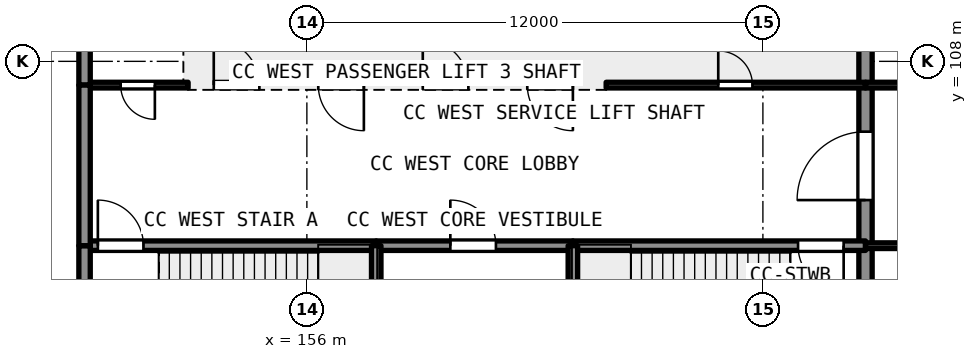
"""IFC4 building model, lengths in metres.
Left out: names, types, materials, properties, quantities, classifications, styles, units other than length and angle.
Written with IfcOpenShell. Run it as: python <this file> out.ifc"""

import sys

from ifc_helpers import new_model, si_unit, direction, frame, frame_2d, origin, place, context, subcontext, project, spatial, rectangle, extrude, element, fill, save


model = new_model("IFC4")
c1 = context("Model", 3, precision=1e-05, world=origin(), true_north=direction((0.0, 1.0)))
c2 = subcontext(c1, "Body", "Model", "MODEL_VIEW")
j1 = project(units=[si_unit("LENGTHUNIT", "METRE"), si_unit("PLANEANGLEUNIT", "RADIAN")], contexts=[c1])
p1 = place(None, origin())
s1 = spatial("IfcSite", under=j1, at=p1, CompositionType="ELEMENT")
p2 = place(p1, origin())
s2 = spatial("IfcBuilding", under=s1, at=p2, CompositionType="ELEMENT")
p3 = place(p2, frame((0.0, 0.0, 20.4)))
s3 = spatial("IfcBuildingStorey", under=s2, at=p3, CompositionType="ELEMENT", Elevation=20.4)
p4 = place(p3, frame((170.7, 100.0, 0.0), z_axis=(0.0, 0.0, 1.0), x_axis=(0.0, 1.0, 0.0)))
e1 = element("IfcWall", 1, at=p4, inside=s3, PredefinedType="SHEAR", context=c2, shape_type="SweptSolid", body=[
    extrude(rectangle(XDim=3.15, YDim=0.35, at=frame_2d((1.575, 0.0))), origin(), (0.0, 0.0, 1.0), 4.59),
])
p5 = place(p3, frame((170.7, 103.15, 0.0), z_axis=(0.0, 0.0, 1.0), x_axis=(0.0, 1.0, 0.0)))
e2 = element("IfcWall", 2, at=p5, inside=s3, PredefinedType="SHEAR", context=c2, shape_type="SweptSolid", body=[
    extrude(rectangle(XDim=7.25, YDim=0.35, at=frame_2d((3.625, 0.0))), origin(), (0.0, 0.0, 1.0), 4.59),
])
p6 = place(p5, frame((1.2, 0.0, 0.0)))
e3 = element("IfcOpeningElement", 3, at=p6, cuts=e2, PredefinedType="OPENING", context=c2, shape_type="SweptSolid", body=[
    extrude(rectangle(XDim=1.8, YDim=2.1, at=frame_2d((0.9, 1.05))), frame((0.0, 0.186, 0.0), z_axis=(0.0, -1.0, 0.0), x_axis=(1.0, 0.0, 0.0)), (0.0, 0.0, 1.0), 0.371),
])
p7 = place(p3, frame((150.3, 103.15, 0.0), z_axis=(0.0, 0.0, 1.0), x_axis=(1.0, 0.0, 0.0)))
e4 = element("IfcWall", 4, at=p7, inside=s3, PredefinedType="SHEAR", context=c2, shape_type="SweptSolid", body=[
    extrude(rectangle(XDim=7.525, YDim=0.25, at=frame_2d((3.762, 0.0))), origin(), (0.0, 0.0, 1.0), 4.59),
])
p8 = place(p7, frame((0.2, 0.0, 0.0)))
e5 = element("IfcOpeningElement", 5, at=p8, cuts=e4, PredefinedType="OPENING", context=c2, shape_type="SweptSolid", body=[
    extrude(rectangle(XDim=1.2, YDim=2.1, at=frame_2d((0.6, 1.05))), frame((0.0, 0.135, 0.0), z_axis=(0.0, -1.0, 0.0), x_axis=(1.0, 0.0, 0.0)), (0.0, 0.0, 1.0), 0.271),
])
p9 = place(p3, frame((157.825, 103.15, 0.0), z_axis=(0.0, 0.0, 1.0), x_axis=(1.0, 0.0, 0.0)))
e6 = element("IfcWall", 6, at=p9, inside=s3, PredefinedType="SHEAR", context=c2, shape_type="SweptSolid", body=[
    extrude(rectangle(XDim=5.175, YDim=0.25, at=frame_2d((2.587, 0.0))), origin(), (0.0, 0.0, 1.0), 4.59),
])
p10 = place(p9, frame((1.95, 0.0, 0.0)))
e7 = element("IfcOpeningElement", 7, at=p10, cuts=e6, PredefinedType="OPENING", context=c2, shape_type="SweptSolid", body=[
    extrude(rectangle(XDim=1.2, YDim=2.1, at=frame_2d((0.6, 1.05))), frame((0.0, 0.135, 0.0), z_axis=(0.0, -1.0, 0.0), x_axis=(1.0, 0.0, 0.0)), (0.0, 0.0, 1.0), 0.271),
])
p11 = place(p3, frame((163.0, 103.15, 0.0), z_axis=(0.0, 0.0, 1.0), x_axis=(1.0, 0.0, 0.0)))
e8 = element("IfcWall", 8, at=p11, inside=s3, PredefinedType="SHEAR", context=c2, shape_type="SweptSolid", body=[
    extrude(rectangle(XDim=7.7, YDim=0.25, at=frame_2d((3.85, 0.0))), origin(), (0.0, 0.0, 1.0), 4.59),
])
p12 = place(p11, frame((5.925, 0.0, 0.0)))
e9 = element("IfcOpeningElement", 9, at=p12, cuts=e8, PredefinedType="OPENING", context=c2, shape_type="SweptSolid", body=[
    extrude(rectangle(XDim=1.2, YDim=2.1, at=frame_2d((0.6, 1.05))), frame((0.0, 0.135, 0.0), z_axis=(0.0, -1.0, 0.0), x_axis=(1.0, 0.0, 0.0)), (0.0, 0.0, 1.0), 0.271),
])
for number, where, z_axis, x_axis in (
    (10, (157.825, 100.0, 0.0), (0.0, 0.0, 1.0), (0.0, 1.0, 0.0)),
    (11, (163.0, 100.0, 0.0), (0.0, 0.0, 1.0), (0.0, 1.0, 0.0)),
):
    element("IfcWall", number, at=place(p3, frame(where, z_axis=z_axis, x_axis=x_axis)), inside=s3, PredefinedType="SHEAR", context=c2, shape_type="SweptSolid", body=[
        extrude(rectangle(XDim=3.15, YDim=0.25, at=frame_2d((1.575, 0.0))), origin(), (0.0, 0.0, 1.0), 4.59),
    ])
p13 = place(p2, origin())
s4 = spatial("IfcBuildingStorey", under=s2, at=p13, CompositionType="ELEMENT", Elevation=0.0)
for number, where, z_axis, x_axis in (
    (12, (152.875, 107.375, -1.2), (0.0, 0.0, 1.0), (0.0, 1.0, 0.0)),
    (13, (155.625, 107.375, -1.2), (0.0, 0.0, 1.0), (0.0, 1.0, 0.0)),
    (14, (158.375, 107.375, -1.2), (0.0, 0.0, 1.0), (0.0, 1.0, 0.0)),
    (15, (161.125, 107.375, -1.2), (0.0, 0.0, 1.0), (0.0, 1.0, 0.0)),
    (16, (163.875, 107.375, -1.2), (0.0, 0.0, 1.0), (0.0, 1.0, 0.0)),
):
    element("IfcWall", number, at=place(p13, frame(where, z_axis=z_axis, x_axis=x_axis)), inside=s4, PredefinedType="SHEAR", context=c2, shape_type="SweptSolid", body=[
        extrude(rectangle(XDim=3.025, YDim=0.25, at=frame_2d((1.512, 0.0))), origin(), (0.0, 0.0, 1.0), 30.79),
    ])
p14 = place(p13, frame((163.875, 107.375, -1.2), z_axis=(0.0, 0.0, 1.0), x_axis=(-1.0, 0.0, 0.0)))
e17 = element("IfcWall", 17, at=p14, inside=s4, PredefinedType="SHEAR", context=c2, shape_type="SweptSolid", body=[
    extrude(rectangle(XDim=11.0, YDim=0.25, at=frame_2d((5.5, 0.0))), origin(), (0.0, 0.0, 1.0), 30.79),
])
p15 = place(p14, frame((9.125, 0.0, 1.2)))
e18 = element("IfcOpeningElement", 18, at=p15, cuts=e17, PredefinedType="OPENING", context=c2, shape_type="SweptSolid", body=[
    extrude(rectangle(XDim=1.2, YDim=2.1, at=frame_2d((0.6, 1.05))), frame((0.0, 0.135, 0.0), z_axis=(0.0, -1.0, 0.0), x_axis=(1.0, 0.0, 0.0)), (0.0, 0.0, 1.0), 0.271),
])
p16 = place(p14, frame((6.375, 0.0, 1.2)))
e19 = element("IfcOpeningElement", 19, at=p16, cuts=e17, PredefinedType="OPENING", context=c2, shape_type="SweptSolid", body=[
    extrude(rectangle(XDim=1.2, YDim=2.1, at=frame_2d((0.6, 1.05))), frame((0.0, 0.135, 0.0), z_axis=(0.0, -1.0, 0.0), x_axis=(1.0, 0.0, 0.0)), (0.0, 0.0, 1.0), 0.271),
])
p17 = place(p14, frame((3.625, 0.0, 1.2)))
e20 = element("IfcOpeningElement", 20, at=p17, cuts=e17, PredefinedType="OPENING", context=c2, shape_type="SweptSolid", body=[
    extrude(rectangle(XDim=1.2, YDim=2.1, at=frame_2d((0.6, 1.05))), frame((0.0, 0.135, 0.0), z_axis=(0.0, -1.0, 0.0), x_axis=(1.0, 0.0, 0.0)), (0.0, 0.0, 1.0), 0.271),
])
p18 = place(p14, frame((0.875, 0.0, 1.2)))
e21 = element("IfcOpeningElement", 21, at=p18, cuts=e17, PredefinedType="OPENING", context=c2, shape_type="SweptSolid", body=[
    extrude(rectangle(XDim=1.2, YDim=2.1, at=frame_2d((0.6, 1.05))), frame((0.0, 0.135, 0.0), z_axis=(0.0, -1.0, 0.0), x_axis=(1.0, 0.0, 0.0)), (0.0, 0.0, 1.0), 0.271),
])
p19 = place(p14, frame((9.125, 0.0, 10.2)))
e22 = element("IfcOpeningElement", 22, at=p19, cuts=e17, PredefinedType="OPENING", context=c2, shape_type="SweptSolid", body=[
    extrude(rectangle(XDim=1.2, YDim=2.1, at=frame_2d((0.6, 1.05))), frame((0.0, 0.135, 0.0), z_axis=(0.0, -1.0, 0.0), x_axis=(1.0, 0.0, 0.0)), (0.0, 0.0, 1.0), 0.271),
])
p20 = place(p14, frame((6.375, 0.0, 10.2)))
e23 = element("IfcOpeningElement", 23, at=p20, cuts=e17, PredefinedType="OPENING", context=c2, shape_type="SweptSolid", body=[
    extrude(rectangle(XDim=1.2, YDim=2.1, at=frame_2d((0.6, 1.05))), frame((0.0, 0.135, 0.0), z_axis=(0.0, -1.0, 0.0), x_axis=(1.0, 0.0, 0.0)), (0.0, 0.0, 1.0), 0.271),
])
p21 = place(p14, frame((3.625, 0.0, 10.2)))
e24 = element("IfcOpeningElement", 24, at=p21, cuts=e17, PredefinedType="OPENING", context=c2, shape_type="SweptSolid", body=[
    extrude(rectangle(XDim=1.2, YDim=2.1, at=frame_2d((0.6, 1.05))), frame((0.0, 0.135, 0.0), z_axis=(0.0, -1.0, 0.0), x_axis=(1.0, 0.0, 0.0)), (0.0, 0.0, 1.0), 0.271),
])
p22 = place(p14, frame((0.875, 0.0, 10.2)))
e25 = element("IfcOpeningElement", 25, at=p22, cuts=e17, PredefinedType="OPENING", context=c2, shape_type="SweptSolid", body=[
    extrude(rectangle(XDim=1.2, YDim=2.1, at=frame_2d((0.6, 1.05))), frame((0.0, 0.135, 0.0), z_axis=(0.0, -1.0, 0.0), x_axis=(1.0, 0.0, 0.0)), (0.0, 0.0, 1.0), 0.271),
])
p23 = place(p14, frame((9.125, 0.0, 16.2)))
e26 = element("IfcOpeningElement", 26, at=p23, cuts=e17, PredefinedType="OPENING", context=c2, shape_type="SweptSolid", body=[
    extrude(rectangle(XDim=1.2, YDim=2.1, at=frame_2d((0.6, 1.05))), frame((0.0, 0.135, 0.0), z_axis=(0.0, -1.0, 0.0), x_axis=(1.0, 0.0, 0.0)), (0.0, 0.0, 1.0), 0.271),
])
p24 = place(p14, frame((6.375, 0.0, 16.2)))
e27 = element("IfcOpeningElement", 27, at=p24, cuts=e17, PredefinedType="OPENING", context=c2, shape_type="SweptSolid", body=[
    extrude(rectangle(XDim=1.2, YDim=2.1, at=frame_2d((0.6, 1.05))), frame((0.0, 0.135, 0.0), z_axis=(0.0, -1.0, 0.0), x_axis=(1.0, 0.0, 0.0)), (0.0, 0.0, 1.0), 0.271),
])
p25 = place(p14, frame((3.625, 0.0, 16.2)))
e28 = element("IfcOpeningElement", 28, at=p25, cuts=e17, PredefinedType="OPENING", context=c2, shape_type="SweptSolid", body=[
    extrude(rectangle(XDim=1.2, YDim=2.1, at=frame_2d((0.6, 1.05))), frame((0.0, 0.135, 0.0), z_axis=(0.0, -1.0, 0.0), x_axis=(1.0, 0.0, 0.0)), (0.0, 0.0, 1.0), 0.271),
])
p26 = place(p14, frame((0.875, 0.0, 16.2)))
e29 = element("IfcOpeningElement", 29, at=p26, cuts=e17, PredefinedType="OPENING", context=c2, shape_type="SweptSolid", body=[
    extrude(rectangle(XDim=1.2, YDim=2.1, at=frame_2d((0.6, 1.05))), frame((0.0, 0.135, 0.0), z_axis=(0.0, -1.0, 0.0), x_axis=(1.0, 0.0, 0.0)), (0.0, 0.0, 1.0), 0.271),
])
p27 = place(p14, frame((9.125, 0.0, 21.6)))
e30 = element("IfcOpeningElement", 30, at=p27, cuts=e17, PredefinedType="OPENING", context=c2, shape_type="SweptSolid", body=[
    extrude(rectangle(XDim=1.2, YDim=2.1, at=frame_2d((0.6, 1.05))), frame((0.0, 0.135, 0.0), z_axis=(0.0, -1.0, 0.0), x_axis=(1.0, 0.0, 0.0)), (0.0, 0.0, 1.0), 0.271),
])
p28 = place(p14, frame((6.375, 0.0, 21.6)))
e31 = element("IfcOpeningElement", 31, at=p28, cuts=e17, PredefinedType="OPENING", context=c2, shape_type="SweptSolid", body=[
    extrude(rectangle(XDim=1.2, YDim=2.1, at=frame_2d((0.6, 1.05))), frame((0.0, 0.135, 0.0), z_axis=(0.0, -1.0, 0.0), x_axis=(1.0, 0.0, 0.0)), (0.0, 0.0, 1.0), 0.271),
])
p29 = place(p14, frame((3.625, 0.0, 21.6)))
e32 = element("IfcOpeningElement", 32, at=p29, cuts=e17, PredefinedType="OPENING", context=c2, shape_type="SweptSolid", body=[
    extrude(rectangle(XDim=1.2, YDim=2.1, at=frame_2d((0.6, 1.05))), frame((0.0, 0.135, 0.0), z_axis=(0.0, -1.0, 0.0), x_axis=(1.0, 0.0, 0.0)), (0.0, 0.0, 1.0), 0.271),
])
p30 = place(p14, frame((0.875, 0.0, 21.6)))
e33 = element("IfcOpeningElement", 33, at=p30, cuts=e17, PredefinedType="OPENING", context=c2, shape_type="SweptSolid", body=[
    extrude(rectangle(XDim=1.2, YDim=2.1, at=frame_2d((0.6, 1.05))), frame((0.0, 0.135, 0.0), z_axis=(0.0, -1.0, 0.0), x_axis=(1.0, 0.0, 0.0)), (0.0, 0.0, 1.0), 0.271),
])
p31 = place(p14, frame((9.125, 0.0, 26.6)))
e34 = element("IfcOpeningElement", 34, at=p31, cuts=e17, PredefinedType="OPENING", context=c2, shape_type="SweptSolid", body=[
    extrude(rectangle(XDim=1.2, YDim=2.1, at=frame_2d((0.6, 1.05))), frame((0.0, 0.135, 0.0), z_axis=(0.0, -1.0, 0.0), x_axis=(1.0, 0.0, 0.0)), (0.0, 0.0, 1.0), 0.271),
])
p32 = place(p14, frame((6.375, 0.0, 26.6)))
e35 = element("IfcOpeningElement", 35, at=p32, cuts=e17, PredefinedType="OPENING", context=c2, shape_type="SweptSolid", body=[
    extrude(rectangle(XDim=1.2, YDim=2.1, at=frame_2d((0.6, 1.05))), frame((0.0, 0.135, 0.0), z_axis=(0.0, -1.0, 0.0), x_axis=(1.0, 0.0, 0.0)), (0.0, 0.0, 1.0), 0.271),
])
p33 = place(p14, frame((3.625, 0.0, 26.6)))
e36 = element("IfcOpeningElement", 36, at=p33, cuts=e17, PredefinedType="OPENING", context=c2, shape_type="SweptSolid", body=[
    extrude(rectangle(XDim=1.2, YDim=2.1, at=frame_2d((0.6, 1.05))), frame((0.0, 0.135, 0.0), z_axis=(0.0, -1.0, 0.0), x_axis=(1.0, 0.0, 0.0)), (0.0, 0.0, 1.0), 0.271),
])
p34 = place(p14, frame((0.875, 0.0, 26.6)))
e37 = element("IfcOpeningElement", 37, at=p34, cuts=e17, PredefinedType="OPENING", context=c2, shape_type="SweptSolid", body=[
    extrude(rectangle(XDim=1.2, YDim=2.1, at=frame_2d((0.6, 1.05))), frame((0.0, 0.135, 0.0), z_axis=(0.0, -1.0, 0.0), x_axis=(1.0, 0.0, 0.0)), (0.0, 0.0, 1.0), 0.271),
])
p35 = place(p3, frame((150.3, 107.375, 0.0), z_axis=(0.0, 0.0, 1.0), x_axis=(1.0, 0.0, 0.0)))
e38 = element("IfcWall", 38, at=p35, inside=s3, PredefinedType="PARTITIONING", context=c2, shape_type="SweptSolid", body=[
    extrude(rectangle(XDim=2.575, YDim=0.15, at=frame_2d((1.288, 0.0))), origin(), (0.0, 0.0, 1.0), 4.59),
])
p36 = place(p35, frame((0.8, 0.0, 0.0)))
e39 = element("IfcOpeningElement", 39, at=p36, cuts=e38, PredefinedType="OPENING", context=c2, shape_type="SweptSolid", body=[
    extrude(rectangle(XDim=0.9, YDim=2.1, at=frame_2d((0.45, 1.05))), frame((0.0, 0.085, 0.0), z_axis=(0.0, -1.0, 0.0), x_axis=(1.0, 0.0, 0.0)), (0.0, 0.0, 1.0), 0.171),
])
p37 = place(p3, frame((150.15, 107.375, 0.0), z_axis=(0.0, 0.0, 1.0), x_axis=(0.0, 1.0, 0.0)))
e40 = element("IfcWall", 40, at=p37, inside=s3, PredefinedType="SOLIDWALL", context=c2, shape_type="SweptSolid", body=[
    extrude(rectangle(XDim=3.175, YDim=0.3, at=frame_2d((1.587, 0.0))), origin(), (0.0, 0.0, 1.0), 4.59),
])
p38 = place(p3, frame((163.875, 107.375, 0.0), z_axis=(0.0, 0.0, 1.0), x_axis=(1.0, 0.0, 0.0)))
e41 = element("IfcWall", 41, at=p38, inside=s3, PredefinedType="PARTITIONING", context=c2, shape_type="SweptSolid", body=[
    extrude(rectangle(XDim=6.825, YDim=0.15, at=frame_2d((3.413, 0.0))), origin(), (0.0, 0.0, 1.0), 4.59),
])
p39 = place(p38, frame((2.95, 0.0, 0.0)))
e42 = element("IfcOpeningElement", 42, at=p39, cuts=e41, PredefinedType="OPENING", context=c2, shape_type="SweptSolid", body=[
    extrude(rectangle(XDim=0.9, YDim=2.1, at=frame_2d((0.45, 1.05))), frame((0.0, 0.085, 0.0), z_axis=(0.0, -1.0, 0.0), x_axis=(1.0, 0.0, 0.0)), (0.0, 0.0, 1.0), 0.171),
])
p40 = place(p3, frame((150.15, 100.0, 0.0), z_axis=(0.0, 0.0, 1.0), x_axis=(0.0, 1.0, 0.0)))
e43 = element("IfcWall", 43, at=p40, inside=s3, PredefinedType="SOLIDWALL", context=c2, shape_type="SweptSolid", body=[
    extrude(rectangle(XDim=3.15, YDim=0.3, at=frame_2d((1.575, 0.0))), origin(), (0.0, 0.0, 1.0), 4.59),
])
p41 = place(p3, frame((150.15, 103.15, 0.0), z_axis=(0.0, 0.0, 1.0), x_axis=(0.0, 1.0, 0.0)))
e44 = element("IfcWall", 44, at=p41, inside=s3, PredefinedType="SOLIDWALL", context=c2, shape_type="SweptSolid", body=[
    extrude(rectangle(XDim=4.225, YDim=0.3, at=frame_2d((2.113, 0.0))), origin(), (0.0, 0.0, 1.0), 4.59),
])
p42 = place(p3, frame((170.7, 103.15, 0.0), z_axis=(0.0, 0.0, 1.0), x_axis=(1.0, 0.0, 0.0)))
e45 = element("IfcWall", 45, at=p42, inside=s3, PredefinedType="PARTITIONING", context=c2, shape_type="SweptSolid", body=[
    extrude(rectangle(XDim=10.85, YDim=0.15, at=frame_2d((5.425, 0.0))), origin(), (0.0, 0.0, 1.0), 4.59),
])
p43 = place(p42, frame((4.95, 0.0, 0.0)))
e46 = element("IfcOpeningElement", 46, at=p43, cuts=e45, PredefinedType="OPENING", context=c2, shape_type="SweptSolid", body=[
    extrude(rectangle(XDim=1.0, YDim=2.1, at=frame_2d((0.5, 1.05))), frame((0.0, 0.085, 0.0), z_axis=(0.0, -1.0, 0.0), x_axis=(1.0, 0.0, 0.0)), (0.0, 0.0, 1.0), 0.171),
])
p44 = place(p3, frame((209.0, 107.375, 0.0), z_axis=(0.0, 0.0, 1.0), x_axis=(-1.0, 0.0, 0.0)))
e47 = element("IfcWall", 47, at=p44, inside=s3, PredefinedType="PARTITIONING", context=c2, shape_type="SweptSolid", body=[
    extrude(rectangle(XDim=38.3, YDim=0.15, at=frame_2d((19.15, 0.0))), origin(), (0.0, 0.0, 1.0), 4.59),
])
p45 = place(p44, frame((32.85, 0.0, 0.0)))
e48 = element("IfcOpeningElement", 48, at=p45, cuts=e47, PredefinedType="OPENING", context=c2, shape_type="SweptSolid", body=[
    extrude(rectangle(XDim=1.0, YDim=2.1, at=frame_2d((0.5, 1.05))), frame((0.0, 0.085, 0.0), z_axis=(0.0, -1.0, 0.0), x_axis=(1.0, 0.0, 0.0)), (0.0, 0.0, 1.0), 0.171),
])
p46 = place(p44, frame((22.85, 0.0, 0.0)))
e49 = element("IfcOpeningElement", 49, at=p46, cuts=e47, PredefinedType="OPENING", context=c2, shape_type="SweptSolid", body=[
    extrude(rectangle(XDim=1.0, YDim=2.1, at=frame_2d((0.5, 1.05))), frame((0.0, 0.085, 0.0), z_axis=(0.0, -1.0, 0.0), x_axis=(1.0, 0.0, 0.0)), (0.0, 0.0, 1.0), 0.171),
])
p47 = place(p44, frame((13.35, 0.0, 0.0)))
e50 = element("IfcOpeningElement", 50, at=p47, cuts=e47, PredefinedType="OPENING", context=c2, shape_type="SweptSolid", body=[
    extrude(rectangle(XDim=1.0, YDim=2.1, at=frame_2d((0.5, 1.05))), frame((0.0, 0.085, 0.0), z_axis=(0.0, -1.0, 0.0), x_axis=(1.0, 0.0, 0.0)), (0.0, 0.0, 1.0), 0.171),
])
p48 = place(p44, frame((3.95, 0.0, 0.0)))
e51 = element("IfcOpeningElement", 51, at=p48, cuts=e47, PredefinedType="OPENING", context=c2, shape_type="SweptSolid", body=[
    extrude(rectangle(XDim=1.0, YDim=2.1, at=frame_2d((0.5, 1.05))), frame((0.0, 0.085, 0.0), z_axis=(0.0, -1.0, 0.0), x_axis=(1.0, 0.0, 0.0)), (0.0, 0.0, 1.0), 0.171),
])
p49 = place(p6, origin())
e52 = element("IfcDoor", 52, at=p49, inside=s3, OperationType="DOUBLE_DOOR_SINGLE_SWING", PredefinedType="DOOR", context=c2, shape_type="SweptSolid", body=[
    extrude(rectangle(XDim=1.8, YDim=2.1, at=frame_2d((0.9, 1.05))), frame((0.0, 0.025, 0.0), z_axis=(0.0, -1.0, 0.0), x_axis=(1.0, 0.0, 0.0)), (0.0, 0.0, 1.0), 0.05),
])
fill(e3, e52)
p50 = place(p8, origin())
e53 = element("IfcDoor", 53, at=p50, inside=s3, OperationType="SINGLE_SWING_LEFT", PredefinedType="DOOR", context=c2, shape_type="SweptSolid", body=[
    extrude(rectangle(XDim=1.2, YDim=2.1, at=frame_2d((0.6, 1.05))), frame((0.0, 0.025, 0.0), z_axis=(0.0, -1.0, 0.0), x_axis=(1.0, 0.0, 0.0)), (0.0, 0.0, 1.0), 0.05),
])
fill(e5, e53)
p51 = place(p12, origin())
e54 = element("IfcDoor", 54, at=p51, inside=s3, OperationType="SINGLE_SWING_RIGHT", PredefinedType="DOOR", context=c2, shape_type="SweptSolid", body=[
    extrude(rectangle(XDim=1.2, YDim=2.1, at=frame_2d((0.6, 1.05))), frame((0.0, 0.025, 0.0), z_axis=(0.0, -1.0, 0.0), x_axis=(1.0, 0.0, 0.0)), (0.0, 0.0, 1.0), 0.05),
])
fill(e9, e54)
p52 = place(p10, origin())
e55 = element("IfcDoor", 55, at=p52, inside=s3, OperationType="SINGLE_SWING_LEFT", PredefinedType="DOOR", context=c2, shape_type="SweptSolid", body=[
    extrude(rectangle(XDim=1.2, YDim=2.1, at=frame_2d((0.6, 1.05))), frame((0.0, 0.025, 0.0), z_axis=(0.0, -1.0, 0.0), x_axis=(1.0, 0.0, 0.0)), (0.0, 0.0, 1.0), 0.05),
])
fill(e7, e55)
p53 = place(p27, origin())
e56 = element("IfcDoor", 56, at=p53, inside=s3, OperationType="SLIDING_TO_RIGHT", PredefinedType="DOOR", context=c2, shape_type="SweptSolid", body=[
    extrude(rectangle(XDim=1.2, YDim=2.1, at=frame_2d((0.6, 1.05))), frame((0.0, 0.025, 0.0), z_axis=(0.0, -1.0, 0.0), x_axis=(1.0, 0.0, 0.0)), (0.0, 0.0, 1.0), 0.05),
])
fill(e30, e56)
p54 = place(p28, origin())
e57 = element("IfcDoor", 57, at=p54, inside=s3, OperationType="SLIDING_TO_LEFT", PredefinedType="DOOR", context=c2, shape_type="SweptSolid", body=[
    extrude(rectangle(XDim=1.2, YDim=2.1, at=frame_2d((0.6, 1.05))), frame((0.0, 0.025, 0.0), z_axis=(0.0, -1.0, 0.0), x_axis=(1.0, 0.0, 0.0)), (0.0, 0.0, 1.0), 0.05),
])
fill(e31, e57)
p55 = place(p29, origin())
e58 = element("IfcDoor", 58, at=p55, inside=s3, OperationType="SLIDING_TO_RIGHT", PredefinedType="DOOR", context=c2, shape_type="SweptSolid", body=[
    extrude(rectangle(XDim=1.2, YDim=2.1, at=frame_2d((0.6, 1.05))), frame((0.0, 0.025, 0.0), z_axis=(0.0, -1.0, 0.0), x_axis=(1.0, 0.0, 0.0)), (0.0, 0.0, 1.0), 0.05),
])
fill(e32, e58)
p56 = place(p30, origin())
e59 = element("IfcDoor", 59, at=p56, inside=s3, OperationType="SLIDING_TO_LEFT", PredefinedType="DOOR", context=c2, shape_type="SweptSolid", body=[
    extrude(rectangle(XDim=1.2, YDim=2.1, at=frame_2d((0.6, 1.05))), frame((0.0, 0.025, 0.0), z_axis=(0.0, -1.0, 0.0), x_axis=(1.0, 0.0, 0.0)), (0.0, 0.0, 1.0), 0.05),
])
fill(e33, e59)
p57 = place(p36, origin())
e60 = element("IfcDoor", 60, at=p57, inside=s3, OperationType="SINGLE_SWING_RIGHT", PredefinedType="DOOR", context=c2, shape_type="SweptSolid", body=[
    extrude(rectangle(XDim=0.9, YDim=2.1, at=frame_2d((0.45, 1.05))), frame((0.0, 0.025, 0.0), z_axis=(0.0, -1.0, 0.0), x_axis=(1.0, 0.0, 0.0)), (0.0, 0.0, 1.0), 0.05),
])
fill(e39, e60)
p58 = place(p39, origin())
e61 = element("IfcDoor", 61, at=p58, inside=s3, OperationType="SINGLE_SWING_LEFT", PredefinedType="DOOR", context=c2, shape_type="SweptSolid", body=[
    extrude(rectangle(XDim=0.9, YDim=2.1, at=frame_2d((0.45, 1.05))), frame((0.0, 0.025, 0.0), z_axis=(0.0, -1.0, 0.0), x_axis=(1.0, 0.0, 0.0)), (0.0, 0.0, 1.0), 0.05),
])
fill(e42, e61)
save(model, sys.argv[1])
